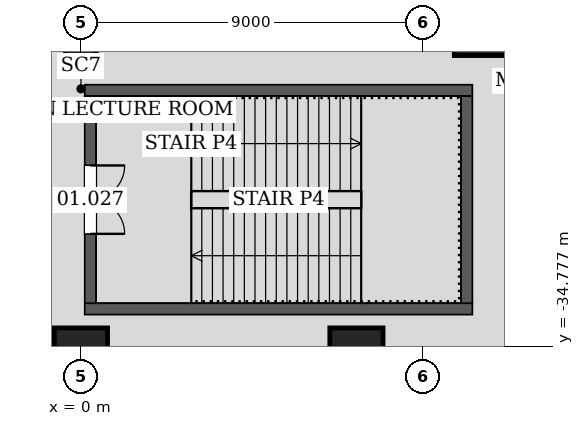
"""IFC4 building model, lengths in metres.
Left out: names, types, materials, properties, quantities, classifications, styles, units other than length and angle.
Written with IfcOpenShell. Run it as: python <this file> out.ifc"""

import sys

from ifc_helpers import new_model, si_unit, direction, frame, frame_2d, origin, origin_2d, place, context, subcontext, project, spatial, rectangle, hollow_rectangle, extrude, element, fill, save


model = new_model("IFC4")
c1 = context("Model", 3, precision=1e-05, world=origin(), true_north=direction((0.0, 1.0)))
c2 = subcontext(c1, "Body", "Model", "MODEL_VIEW")
j1 = project(units=[si_unit("LENGTHUNIT", "METRE"), si_unit("PLANEANGLEUNIT", "RADIAN")], contexts=[c1])
p1 = place(None, origin())
s1 = spatial("IfcSite", under=j1, at=p1, CompositionType="ELEMENT")
p2 = place(p1, origin())
s2 = spatial("IfcBuilding", under=s1, at=p2, CompositionType="ELEMENT")
p3 = place(p2, frame((0.0, 0.0, 7.2)))
s3 = spatial("IfcBuildingStorey", under=s2, at=p3, CompositionType="ELEMENT", Elevation=7.2)
p4 = place(p3, frame((10.824, -26.133, 0.0), z_axis=(-0.011713263234, 0.028266381762, 0.999531795956), x_axis=(-0.923822387517, -0.38282136346, 0.0)))
e1 = element("IfcColumn", 1, at=p4, inside=s3, PredefinedType="COLUMN", context=c2, shape_type="SweptSolid", body=[
    extrude(hollow_rectangle(XDim=2.0, YDim=2.0, WallThickness=0.09, at=origin_2d()), origin(), (0.0, 0.0, 1.0), 6.003),
])
p5 = place(p3, frame((0.0, -27.011, 0.0), z_axis=(0.0, 0.028268321043, 0.999600371161), x_axis=(-1.0, 0.0, 0.0)))
e2 = element("IfcColumn", 2, at=p5, inside=s3, PredefinedType="COLUMN", context=c2, shape_type="SweptSolid", body=[
    extrude(hollow_rectangle(XDim=0.8, YDim=0.8, WallThickness=0.05, at=origin_2d()), origin(), (0.0, 0.0, 1.0), 6.002),
])
for number, where, z_axis, x_axis in (
    (3, (0.0, -35.0, 0.0), (0.0, 0.0, 1.0), (1.0, 0.0, 0.0)),
    (4, (7.249, -35.0, 0.0), (0.0, 0.0, 1.0), (1.0, 0.0, 0.0)),
):
    element("IfcColumn", number, at=place(p3, frame(where, z_axis=z_axis, x_axis=x_axis)), inside=s3, PredefinedType="COLUMN", context=c2, shape_type="SweptSolid", body=[
        extrude(rectangle(XDim=1.4, YDim=1.4, at=origin_2d()), origin(), (0.0, 0.0, 1.0), 6.0),
    ])
for number, where, z_axis, x_axis in (
    (5, (0.1, -33.8, 0.0), (0.0, 0.0, 1.0), (1.0, 0.0, 0.0)),
    (6, (10.3, -28.05, 0.0), (0.0, 0.0, 1.0), (-1.0, 0.0, 0.0)),
):
    element("IfcWall", number, at=place(p3, frame(where, z_axis=z_axis, x_axis=x_axis)), inside=s3, PredefinedType="SOLIDWALL", context=c2, shape_type="SweptSolid", body=[
        extrude(rectangle(XDim=10.2, YDim=0.3, at=frame_2d((5.1, 0.0))), origin(), (0.0, 0.0, 1.0), 6.0),
    ])
p6 = place(p3, frame((0.25, -28.2, 0.0), z_axis=(0.0, 0.0, 1.0), x_axis=(0.0, -1.0, 0.0)))
e7 = element("IfcWall", 7, at=p6, inside=s3, PredefinedType="SOLIDWALL", context=c2, shape_type="SweptSolid", body=[
    extrude(rectangle(XDim=5.45, YDim=0.3, at=frame_2d((2.725, 0.0))), origin(), (0.0, 0.0, 1.0), 6.0),
])
p7 = place(p6, frame((1.825, 0.0, 0.0)))
e8 = element("IfcOpeningElement", 8, at=p7, cuts=e7, PredefinedType="OPENING", context=c2, shape_type="SweptSolid", body=[
    extrude(rectangle(XDim=1.8, YDim=2.1, at=frame_2d((0.9, 1.05))), frame((0.0, 0.16, 0.0), z_axis=(0.0, -1.0, 0.0), x_axis=(1.0, 0.0, 0.0)), (0.0, 0.0, 1.0), 0.32),
])
p8 = place(p3, frame((10.15, -33.65, 0.0), z_axis=(0.0, 0.0, 1.0), x_axis=(0.0, 1.0, 0.0)))
e9 = element("IfcWall", 9, at=p8, inside=s3, PredefinedType="SOLIDWALL", context=c2, shape_type="SweptSolid", body=[
    extrude(rectangle(XDim=5.45, YDim=0.3, at=frame_2d((2.725, 0.0))), origin(), (0.0, 0.0, 1.0), 6.0),
])
p9 = place(p7, origin())
e10 = element("IfcDoor", 10, at=p9, inside=s3, OperationType="DOUBLE_DOOR_SINGLE_SWING", PredefinedType="DOOR", context=c2, shape_type="SweptSolid", body=[
    extrude(rectangle(XDim=1.8, YDim=2.1, at=frame_2d((0.9, 1.05))), frame((0.0, 0.025, 0.0), z_axis=(0.0, -1.0, 0.0), x_axis=(1.0, 0.0, 0.0)), (0.0, 0.0, 1.0), 0.05),
])
fill(e8, e10)
save(model, sys.argv[1])
